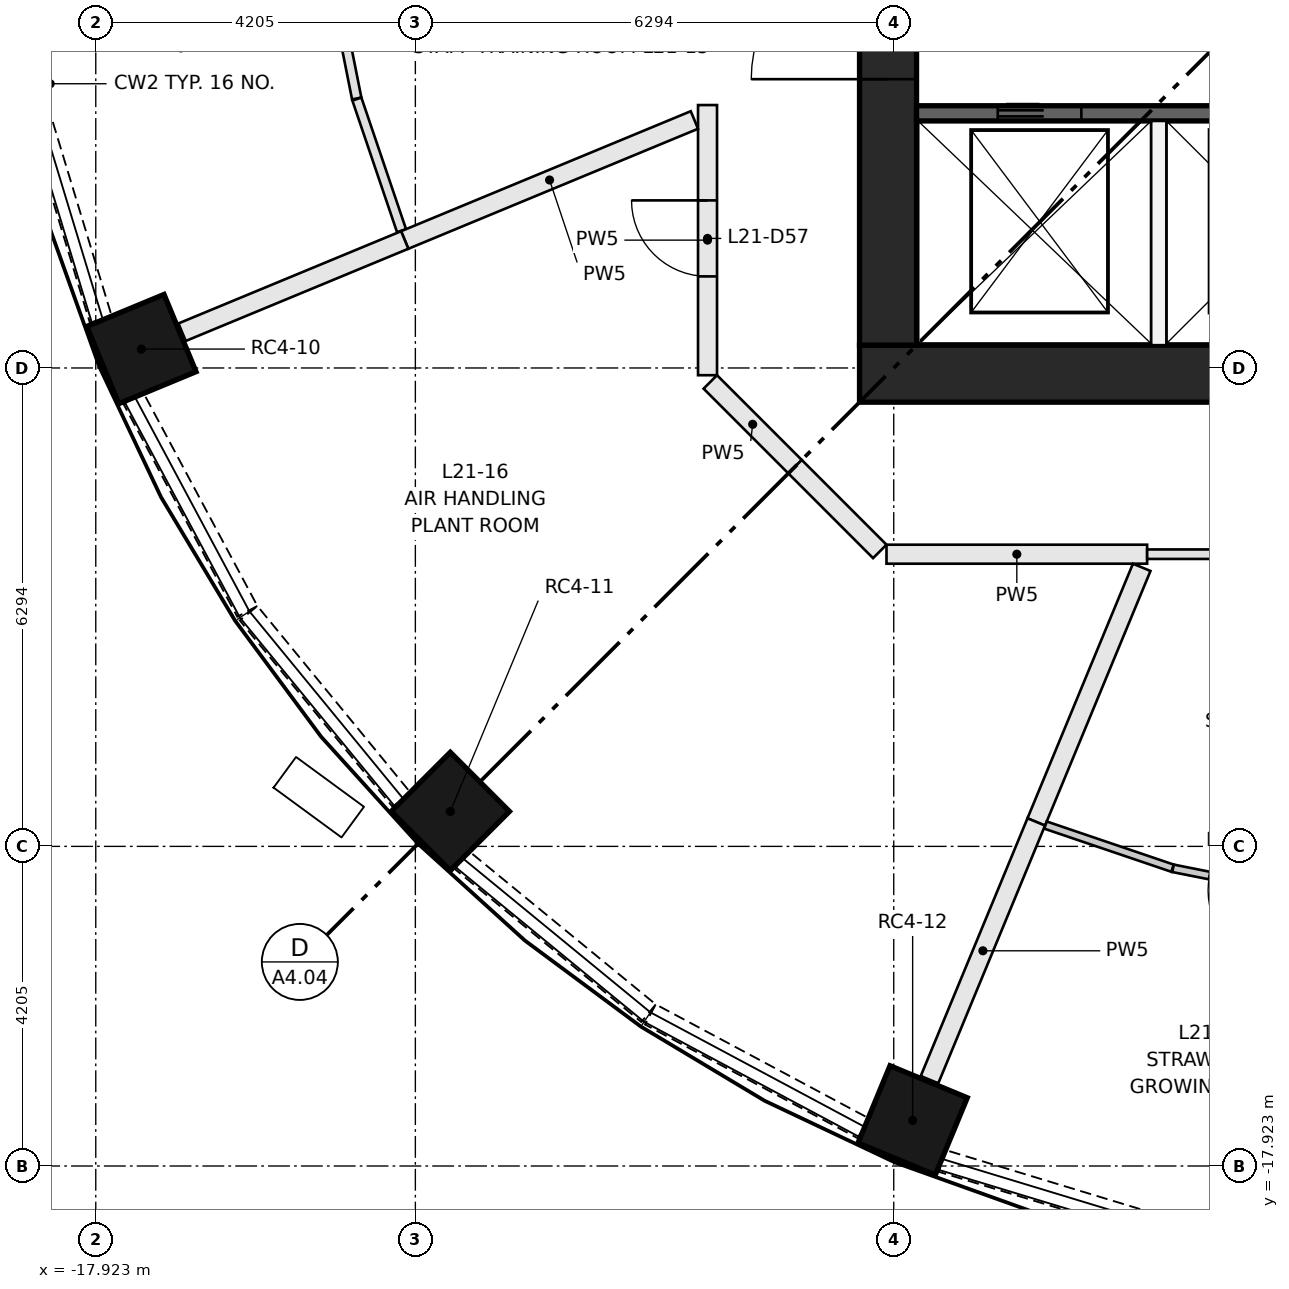
"""IFC4 building model, lengths in metres.
Left out: names, types, materials, properties, quantities, classifications, styles, units other than length and angle.
Written with IfcOpenShell. Run it as: python <this file> out.ifc"""

import sys

from ifc_helpers import new_model, si_unit, direction, frame, frame_2d, origin, origin_2d, place, context, subcontext, project, spatial, rectangle, extrude, element, fill, save


model = new_model("IFC4")
c1 = context("Model", 3, precision=1e-05, world=origin(), true_north=direction((0.0, 1.0)))
c2 = subcontext(c1, "Body", "Model", "MODEL_VIEW")
j1 = project(units=[si_unit("LENGTHUNIT", "METRE"), si_unit("PLANEANGLEUNIT", "RADIAN")], contexts=[c1])
p1 = place(None, origin())
s1 = spatial("IfcSite", under=j1, at=p1, CompositionType="ELEMENT")
p2 = place(p1, origin())
s2 = spatial("IfcBuilding", under=s1, at=p2, CompositionType="ELEMENT")
p3 = place(p2, frame((0.0, 0.0, 83.7)))
s3 = spatial("IfcBuildingStorey", under=s2, at=p3, CompositionType="ELEMENT", Elevation=83.7)
for number, where, z_axis, x_axis in (
    (1, (-17.323, -7.175, 0.0), (0.0, 0.0, 1.0), (-0.924, -0.383, 0.0)),
    (2, (-13.258, -13.258, 0.0), (0.0, 0.0, 1.0), (-0.707, -0.707, 0.0)),
    (3, (-7.175, -17.323, 0.0), (0.0, 0.0, 1.0), (-0.383, -0.924, 0.0)),
):
    element("IfcColumn", number, at=place(p3, frame(where, z_axis=z_axis, x_axis=x_axis)), inside=s3, PredefinedType="COLUMN", context=c2, shape_type="SweptSolid", body=[
        extrude(rectangle(XDim=1.1, YDim=1.1, at=origin_2d()), origin(), (0.0, 0.0, 1.0), 3.65),
    ])
p4 = place(p3, frame((-7.874, -7.499, 0.0), z_axis=(0.0, 0.0, 1.0), x_axis=(1.0, 0.0, 0.0)))
e4 = element("IfcWall", 4, at=p4, inside=s3, PredefinedType="SHEAR", context=c2, shape_type="SweptSolid", body=[
    extrude(rectangle(XDim=15.748, YDim=0.75, at=frame_2d((7.874, 0.0))), origin(), (0.0, 0.0, 1.0), 3.65),
])
p5 = place(p3, frame((-7.499, -7.124, 0.0), z_axis=(0.0, 0.0, 1.0), x_axis=(0.0, 1.0, 0.0)))
e5 = element("IfcWall", 5, at=p5, inside=s3, PredefinedType="SHEAR", context=c2, shape_type="SweptSolid", body=[
    extrude(rectangle(XDim=14.248, YDim=0.75, at=frame_2d((7.124, 0.0))), origin(), (0.0, 0.0, 1.0), 3.65),
])
p6 = place(p5, frame((6.624, 0.0, 0.0)))
e6 = element("IfcOpeningElement", 6, at=p6, cuts=e5, PredefinedType="OPENING", context=c2, shape_type="SweptSolid", body=[
    extrude(rectangle(XDim=1.0, YDim=2.1, at=frame_2d((0.5, 1.05))), frame((0.0, 0.385, 0.0), z_axis=(0.0, -1.0, 0.0), x_axis=(1.0, 0.0, 0.0)), (0.0, 0.0, 1.0), 0.77),
])
p7 = place(p5, frame((3.5, 0.0, 0.0)))
e7 = element("IfcOpeningElement", 7, at=p7, cuts=e5, PredefinedType="OPENING", context=c2, shape_type="SweptSolid", body=[
    extrude(rectangle(XDim=1.8, YDim=2.1, at=frame_2d((0.9, 1.05))), frame((0.0, 0.385, 0.0), z_axis=(0.0, -1.0, 0.0), x_axis=(1.0, 0.0, 0.0)), (0.0, 0.0, 1.0), 0.77),
])
p8 = place(p5, frame((8.948, 0.0, 0.0)))
e8 = element("IfcOpeningElement", 8, at=p8, cuts=e5, PredefinedType="OPENING", context=c2, shape_type="SweptSolid", body=[
    extrude(rectangle(XDim=1.8, YDim=2.1, at=frame_2d((0.9, 1.05))), frame((0.0, 0.385, 0.0), z_axis=(0.0, -1.0, 0.0), x_axis=(1.0, 0.0, 0.0)), (0.0, 0.0, 1.0), 0.77),
])
p9 = place(p5, frame((12.124, 0.0, 0.0)))
e9 = element("IfcOpeningElement", 9, at=p9, cuts=e5, PredefinedType="OPENING", context=c2, shape_type="SweptSolid", body=[
    extrude(rectangle(XDim=1.0, YDim=2.1, at=frame_2d((0.5, 1.05))), frame((0.0, 0.385, 0.0), z_axis=(0.0, -1.0, 0.0), x_axis=(1.0, 0.0, 0.0)), (0.0, 0.0, 1.0), 0.77),
])
p10 = place(p3, frame((-7.124, -4.074, 0.0), z_axis=(0.0, 0.0, 1.0), x_axis=(1.0, 0.0, 0.0)))
e10 = element("IfcWall", 10, at=p10, inside=s3, PredefinedType="SHEAR", context=c2, shape_type="SweptSolid", body=[
    extrude(rectangle(XDim=14.248, YDim=0.2, at=frame_2d((7.124, 0.0))), origin(), (0.0, 0.0, 1.0), 3.3),
])
p11 = place(p10, frame((1.069, 0.0, 0.0)))
e11 = element("IfcOpeningElement", 11, at=p11, cuts=e10, PredefinedType="OPENING", context=c2, shape_type="SweptSolid", body=[
    extrude(rectangle(XDim=1.1, YDim=2.1, at=frame_2d((0.55, 1.05))), frame((0.0, 0.11, 0.0), z_axis=(0.0, -1.0, 0.0), x_axis=(1.0, 0.0, 0.0)), (0.0, 0.0, 1.0), 0.22),
])
p12 = place(p10, frame((4.206, 0.0, 0.0)))
e12 = element("IfcOpeningElement", 12, at=p12, cuts=e10, PredefinedType="OPENING", context=c2, shape_type="SweptSolid", body=[
    extrude(rectangle(XDim=1.1, YDim=2.1, at=frame_2d((0.55, 1.05))), frame((0.0, 0.11, 0.0), z_axis=(0.0, -1.0, 0.0), x_axis=(1.0, 0.0, 0.0)), (0.0, 0.0, 1.0), 0.22),
])
p13 = place(p10, frame((6.808, 0.0, 0.0)))
e13 = element("IfcOpeningElement", 13, at=p13, cuts=e10, PredefinedType="OPENING", context=c2, shape_type="SweptSolid", body=[
    extrude(rectangle(XDim=1.0, YDim=2.1, at=frame_2d((0.5, 1.05))), frame((0.0, 0.11, 0.0), z_axis=(0.0, -1.0, 0.0), x_axis=(1.0, 0.0, 0.0)), (0.0, 0.0, 1.0), 0.22),
])
p14 = place(p10, frame((8.777, 0.0, 0.0)))
e14 = element("IfcOpeningElement", 14, at=p14, cuts=e10, PredefinedType="OPENING", context=c2, shape_type="SweptSolid", body=[
    extrude(rectangle(XDim=1.0, YDim=2.1, at=frame_2d((0.5, 1.05))), frame((0.0, 0.11, 0.0), z_axis=(0.0, -1.0, 0.0), x_axis=(1.0, 0.0, 0.0)), (0.0, 0.0, 1.0), 0.22),
])
p15 = place(p10, frame((10.745, 0.0, 0.0)))
e15 = element("IfcOpeningElement", 15, at=p15, cuts=e10, PredefinedType="OPENING", context=c2, shape_type="SweptSolid", body=[
    extrude(rectangle(XDim=1.0, YDim=2.1, at=frame_2d((0.5, 1.05))), frame((0.0, 0.11, 0.0), z_axis=(0.0, -1.0, 0.0), x_axis=(1.0, 0.0, 0.0)), (0.0, 0.0, 1.0), 0.22),
])
p16 = place(p10, frame((12.714, 0.0, 0.0)))
e16 = element("IfcOpeningElement", 16, at=p16, cuts=e10, PredefinedType="OPENING", context=c2, shape_type="SweptSolid", body=[
    extrude(rectangle(XDim=1.0, YDim=2.1, at=frame_2d((0.5, 1.05))), frame((0.0, 0.11, 0.0), z_axis=(0.0, -1.0, 0.0), x_axis=(1.0, 0.0, 0.0)), (0.0, 0.0, 1.0), 0.22),
])
p17 = place(p3, frame((-3.937, -7.124, 0.0), z_axis=(0.0, 0.0, 1.0), x_axis=(0.0, 1.0, 0.0)))
e17 = element("IfcWall", 17, at=p17, inside=s3, PredefinedType="PARTITIONING", context=c2, shape_type="SweptSolid", body=[
    extrude(rectangle(XDim=2.95, YDim=0.2, at=frame_2d((1.475, 0.0))), origin(), (0.0, 0.0, 1.0), 3.3),
])
p18 = place(p3, frame((-18.778, -3.75, 0.0), z_axis=(0.0, 0.0, 1.0), x_axis=(0.290325591482, -0.956927923582, 0.0)))
e18 = element("IfcWall", 18, at=p18, inside=s3, PredefinedType="SOLIDWALL", context=c2, shape_type="SweptSolid", body=[
    extrude(rectangle(XDim=3.173, YDim=0.3, at=frame_2d((1.586, 0.0))), origin(), (0.0, 0.0, 1.0), 0.9),
])
p19 = place(p3, frame((-17.425, -7.828, 0.0), z_axis=(0.0, 0.0, 1.0), x_axis=(0.471458802606, -0.88188808669, 0.0)))
e19 = element("IfcWall", 19, at=p19, inside=s3, PredefinedType="SOLIDWALL", context=c2, shape_type="SweptSolid", body=[
    extrude(rectangle(XDim=3.172, YDim=0.3, at=frame_2d((1.586, 0.0))), origin(), (0.0, 0.0, 1.0), 0.9),
])
for number, where, z_axis, x_axis in (
    (20, (-15.913, -10.651, 0.0), (0.0, 0.0, 1.0), (0.634, -0.773, 0.0)),
    (21, (-13.104, -13.9, 0.0), (0.0, 0.0, 1.0), (0.773, -0.634, 0.0)),
):
    element("IfcWall", number, at=place(p3, frame(where, z_axis=z_axis, x_axis=x_axis)), inside=s3, PredefinedType="SOLIDWALL", context=c2, shape_type="SweptSolid", body=[
        extrude(rectangle(XDim=3.173, YDim=0.3, at=frame_2d((1.586, 0.0))), origin(), (0.0, 0.0, 1.0), 0.9),
    ])
p20 = place(p3, frame((-10.626, -15.929, 0.0), z_axis=(0.0, 0.0, 1.0), x_axis=(0.88188808669, -0.471458802606, 0.0)))
e22 = element("IfcWall", 22, at=p20, inside=s3, PredefinedType="SOLIDWALL", context=c2, shape_type="SweptSolid", body=[
    extrude(rectangle(XDim=3.172, YDim=0.3, at=frame_2d((1.586, 0.0))), origin(), (0.0, 0.0, 1.0), 0.9),
])
p21 = place(p3, frame((-6.787, -17.856, 0.0), z_axis=(0.0, 0.0, 1.0), x_axis=(0.956927923582, -0.290325591482, 0.0)))
e23 = element("IfcWall", 23, at=p21, inside=s3, PredefinedType="SOLIDWALL", context=c2, shape_type="SweptSolid", body=[
    extrude(rectangle(XDim=3.173, YDim=0.3, at=frame_2d((1.586, 0.0))), origin(), (0.0, 0.0, 1.0), 0.9),
])
p22 = place(p3, frame((-9.874, -7.519, 0.0), z_axis=(0.0, 0.0, 1.0), x_axis=(0.0, 1.0, 0.0)))
e24 = element("IfcWall", 24, at=p22, inside=s3, PredefinedType="PARTITIONING", context=c2, shape_type="SweptSolid", body=[
    extrude(rectangle(XDim=3.554, YDim=0.25, at=frame_2d((1.777, 0.0))), origin(), (0.0, 0.0, 1.0), 3.3),
])
p23 = place(p22, frame((1.3, 0.0, 0.0)))
e25 = element("IfcOpeningElement", 25, at=p23, cuts=e24, PredefinedType="OPENING", context=c2, shape_type="SweptSolid", body=[
    extrude(rectangle(XDim=1.0, YDim=2.1, at=frame_2d((0.5, 1.05))), frame((0.0, 0.135, 0.0), z_axis=(0.0, -1.0, 0.0), x_axis=(1.0, 0.0, 0.0)), (0.0, 0.0, 1.0), 0.27),
])
for number, where, z_axis, x_axis in (
    (26, (-8.722, -8.722, 0.0), (0.0, 0.0, 1.0), (-0.707, 0.707, 0.0)),
    (27, (-7.608, -9.837, 0.0), (0.0, 0.0, 1.0), (-0.707, 0.707, 0.0)),
):
    element("IfcWall", number, at=place(p3, frame(where, z_axis=z_axis, x_axis=x_axis)), inside=s3, PredefinedType="PARTITIONING", context=c2, shape_type="SweptSolid", body=[
        extrude(rectangle(XDim=1.577, YDim=0.25, at=frame_2d((0.788, 0.0))), origin(), (0.0, 0.0, 1.0), 3.3),
    ])
p24 = place(p3, frame((-4.09, -9.874, 0.0), z_axis=(0.0, 0.0, 1.0), x_axis=(-1.0, 0.0, 0.0)))
e28 = element("IfcWall", 28, at=p24, inside=s3, PredefinedType="PARTITIONING", context=c2, shape_type="SweptSolid", body=[
    extrude(rectangle(XDim=3.429, YDim=0.25, at=frame_2d((1.715, 0.0))), origin(), (0.0, 0.0, 1.0), 3.3),
])
p25 = place(p3, frame((0.0, -9.874, 0.0), z_axis=(0.0, 0.0, 1.0), x_axis=(-1.0, 0.0, 0.0)))
e29 = element("IfcWall", 29, at=p25, inside=s3, PredefinedType="PARTITIONING", context=c2, shape_type="SweptSolid", body=[
    extrude(rectangle(XDim=4.09, YDim=0.125, at=frame_2d((2.045, 0.0))), origin(), (0.0, 0.0, 1.0), 3.3),
])
p26 = place(p25, frame((1.5, 0.0, 0.0)))
e30 = element("IfcOpeningElement", 30, at=p26, cuts=e29, PredefinedType="OPENING", context=c2, shape_type="SweptSolid", body=[
    extrude(rectangle(XDim=1.0, YDim=2.1, at=frame_2d((0.5, 1.05))), frame((0.0, 0.073, 0.0), z_axis=(0.0, -1.0, 0.0), x_axis=(1.0, 0.0, 0.0)), (0.0, 0.0, 1.0), 0.145),
])
p27 = place(p3, frame((-14.49, -3.878, 0.0), z_axis=(0.0, 0.0, 1.0), x_axis=(-0.195034785279, 0.980796325713, 0.0)))
e31 = element("IfcWall", 31, at=p27, inside=s3, PredefinedType="PARTITIONING", context=c2, shape_type="SweptSolid", body=[
    extrude(rectangle(XDim=1.954, YDim=0.125, at=frame_2d((0.977, 0.0))), origin(), (0.0, 0.0, 1.0), 3.3),
])
p28 = place(p3, frame((-13.9, -5.618, 0.0), z_axis=(0.0, 0.0, 1.0), x_axis=(-0.321390424162, 0.946946775303, 0.0)))
e32 = element("IfcWall", 32, at=p28, inside=s3, PredefinedType="PARTITIONING", context=c2, shape_type="SweptSolid", body=[
    extrude(rectangle(XDim=1.828, YDim=0.125, at=frame_2d((0.914, 0.0))), origin(), (0.0, 0.0, 1.0), 3.3),
])
p29 = place(p3, frame((-10.047, -4.162, 0.0), z_axis=(0.0, 0.0, 1.0), x_axis=(-0.92388555685, -0.382668888001, 0.0)))
e33 = element("IfcWall", 33, at=p29, inside=s3, PredefinedType="PARTITIONING", context=c2, shape_type="SweptSolid", body=[
    extrude(rectangle(XDim=4.125, YDim=0.25, at=frame_2d((2.062, 0.0))), origin(), (0.0, 0.0, 1.0), 3.3),
])
p30 = place(p3, frame((-13.858, -5.74, 0.0), z_axis=(0.0, 0.0, 1.0), x_axis=(-0.923876970079, -0.382689618566, 0.0)))
e34 = element("IfcWall", 34, at=p30, inside=s3, PredefinedType="PARTITIONING", context=c2, shape_type="SweptSolid", body=[
    extrude(rectangle(XDim=3.17, YDim=0.25, at=frame_2d((1.585, 0.0))), origin(), (0.0, 0.0, 1.0), 3.3),
])
p31 = place(p3, frame((-4.162, -10.047, 0.0), z_axis=(0.0, 0.0, 1.0), x_axis=(-0.382649180879, -0.923893719197, 0.0)))
e35 = element("IfcWall", 35, at=p31, inside=s3, PredefinedType="PARTITIONING", context=c2, shape_type="SweptSolid", body=[
    extrude(rectangle(XDim=3.625, YDim=0.25, at=frame_2d((1.812, 0.0))), origin(), (0.0, 0.0, 1.0), 3.3),
])
p32 = place(p3, frame((-5.549, -13.396, 0.0), z_axis=(0.0, 0.0, 1.0), x_axis=(-0.382706260748, -0.923870076355, 0.0)))
e36 = element("IfcWall", 36, at=p32, inside=s3, PredefinedType="PARTITIONING", context=c2, shape_type="SweptSolid", body=[
    extrude(rectangle(XDim=3.67, YDim=0.25, at=frame_2d((1.835, 0.0))), origin(), (0.0, 0.0, 1.0), 3.3),
])
p33 = place(p3, frame((-3.756, -14.005, 0.0), z_axis=(0.0, 0.0, 1.0), x_axis=(-0.946911786272, 0.321493497633, 0.0)))
e37 = element("IfcWall", 37, at=p33, inside=s3, PredefinedType="PARTITIONING", context=c2, shape_type="SweptSolid", body=[
    extrude(rectangle(XDim=1.765, YDim=0.1, at=frame_2d((0.882, 0.0))), origin(), (0.0, 0.0, 1.0), 3.3),
])
p34 = place(p3, frame((-1.896, -14.375, 0.0), z_axis=(0.0, 0.0, 1.0), x_axis=(-0.980773924018, 0.19514740574, 0.0)))
e38 = element("IfcWall", 38, at=p34, inside=s3, PredefinedType="PARTITIONING", context=c2, shape_type="SweptSolid", body=[
    extrude(rectangle(XDim=1.89, YDim=0.1, at=frame_2d((0.945, 0.0))), origin(), (0.0, 0.0, 1.0), 3.3),
])
p35 = place(p34, frame((0.4, 0.0, 0.0)))
e39 = element("IfcOpeningElement", 39, at=p35, cuts=e38, PredefinedType="OPENING", context=c2, shape_type="SweptSolid", body=[
    extrude(rectangle(XDim=1.0, YDim=2.1, at=frame_2d((0.5, 1.05))), frame((0.0, 0.06, 0.0), z_axis=(0.0, -1.0, 0.0), x_axis=(1.0, 0.0, 0.0)), (0.0, 0.0, 1.0), 0.12),
])
p36 = place(p11, origin())
e40 = element("IfcDoor", 40, at=p36, inside=s3, OperationType="DOUBLE_DOOR_SLIDING", PredefinedType="DOOR", context=c2, shape_type="SweptSolid", body=[
    extrude(rectangle(XDim=1.1, YDim=2.1, at=frame_2d((0.55, 1.05))), frame((0.0, 0.025, 0.0), z_axis=(0.0, -1.0, 0.0), x_axis=(1.0, 0.0, 0.0)), (0.0, 0.0, 1.0), 0.05),
])
fill(e11, e40)
p37 = place(p7, origin())
e41 = element("IfcDoor", 41, at=p37, inside=s3, OperationType="DOUBLE_DOOR_SINGLE_SWING", PredefinedType="DOOR", context=c2, shape_type="SweptSolid", body=[
    extrude(rectangle(XDim=1.8, YDim=2.1, at=frame_2d((0.9, 1.05))), frame((0.0, 0.025, 0.0), z_axis=(0.0, -1.0, 0.0), x_axis=(1.0, 0.0, 0.0)), (0.0, 0.0, 1.0), 0.05),
])
fill(e7, e41)
p38 = place(p23, origin())
e42 = element("IfcDoor", 42, at=p38, inside=s3, OperationType="SINGLE_SWING_RIGHT", PredefinedType="DOOR", context=c2, shape_type="SweptSolid", body=[
    extrude(rectangle(XDim=1.0, YDim=2.1, at=frame_2d((0.5, 1.05))), frame((0.0, 0.025, 0.0), z_axis=(0.0, -1.0, 0.0), x_axis=(1.0, 0.0, 0.0)), (0.0, 0.0, 1.0), 0.05),
])
fill(e25, e42)
save(model, sys.argv[1])
